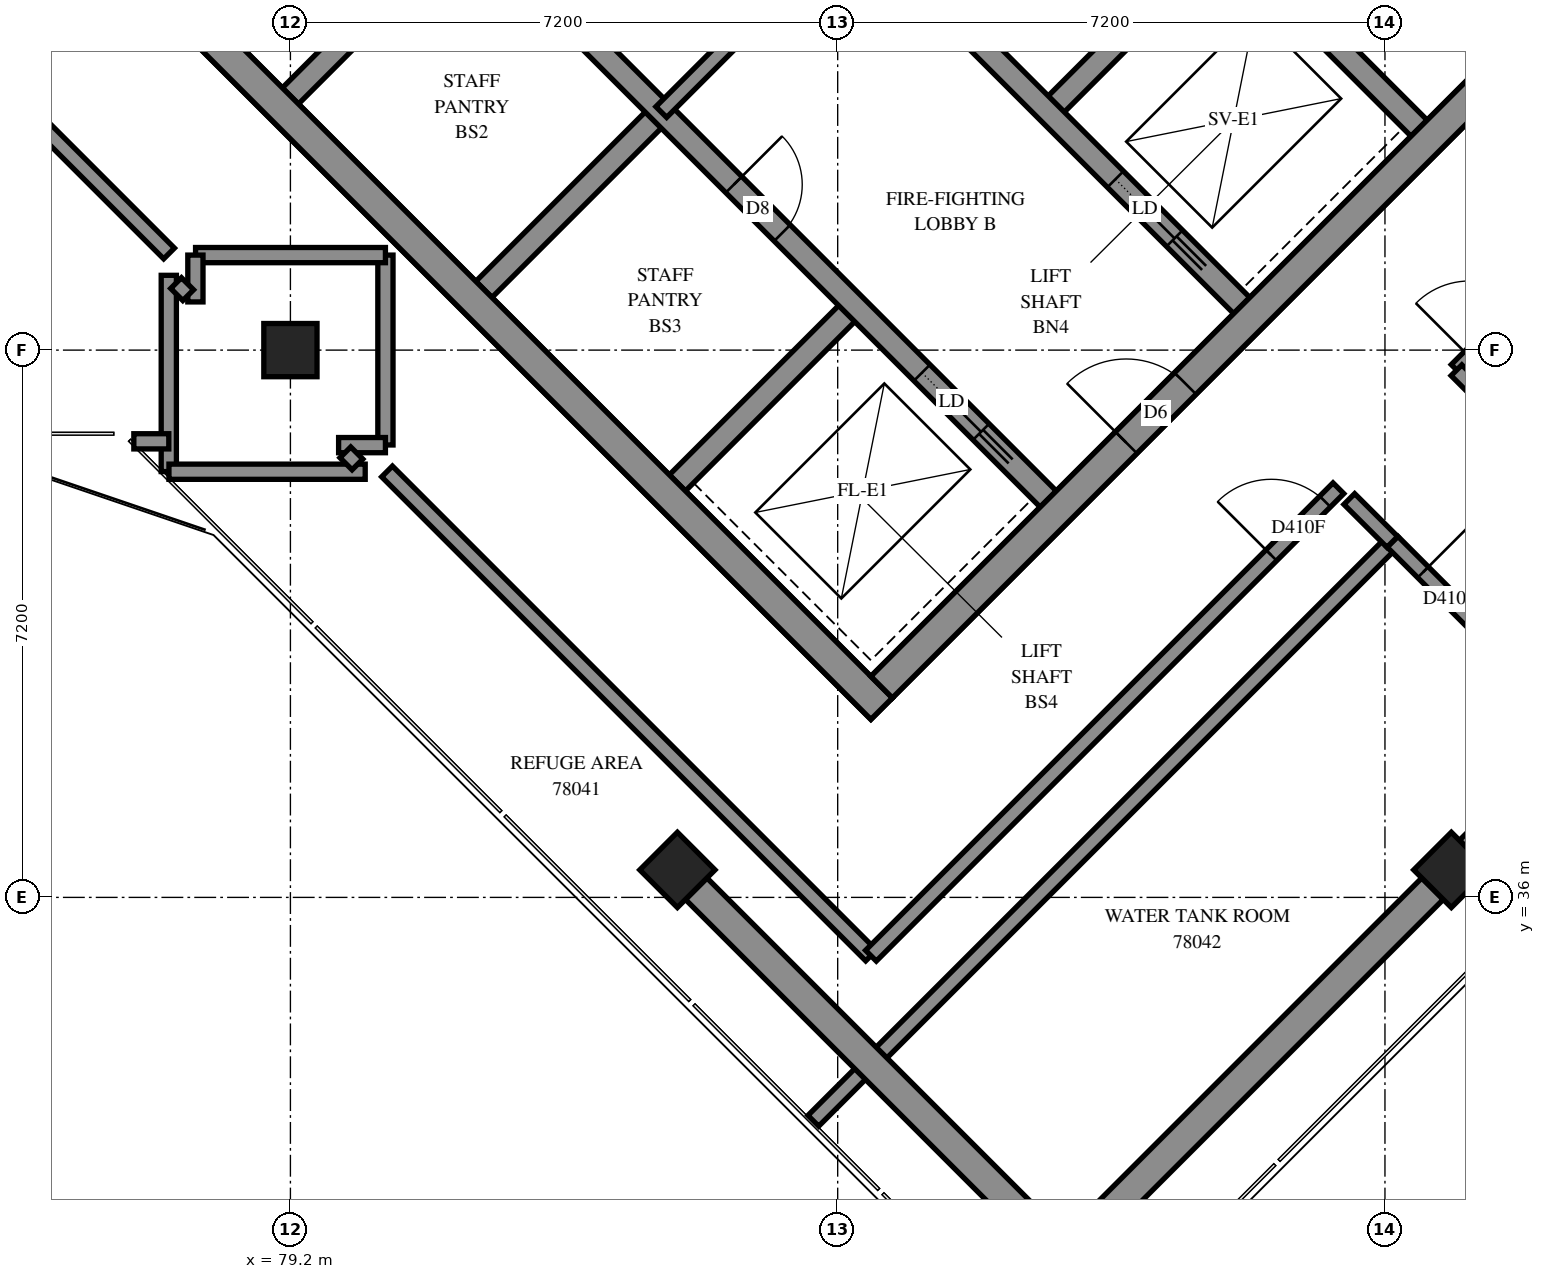
"""IFC4 building model, lengths in metres.
Left out: names, types, materials, properties, quantities, classifications, styles, units other than length and angle.
Written with IfcOpenShell. Run it as: python <this file> out.ifc"""

import sys

from ifc_helpers import new_model, si_unit, direction, frame, frame_2d, origin, origin_2d, place, context, subcontext, project, spatial, rectangle, extrude, element, fill, save


model = new_model("IFC4")
c1 = context("Model", 3, precision=1e-05, world=origin(), true_north=direction((0.0, 1.0)))
c2 = subcontext(c1, "Body", "Model", "MODEL_VIEW")
j1 = project(units=[si_unit("LENGTHUNIT", "METRE"), si_unit("PLANEANGLEUNIT", "RADIAN")], contexts=[c1])
p1 = place(None, origin())
s1 = spatial("IfcSite", under=j1, at=p1, CompositionType="ELEMENT")
p2 = place(p1, origin())
s2 = spatial("IfcBuilding", under=s1, at=p2, CompositionType="ELEMENT")
p3 = place(p2, frame((0.0, 0.0, 284.6)))
s3 = spatial("IfcBuildingStorey", under=s2, at=p3, CompositionType="ELEMENT", Elevation=284.6)
for number, where, z_axis, x_axis in (
    (1, (79.2, 43.2, 0.0), (0.0, 0.0, 1.0), (1.0, 0.0, 0.0)),
    (2, (84.291, 36.362, 0.0), (0.0, 0.0, 1.0), (0.707, -0.707, 0.0)),
    (3, (94.474, 36.362, 0.0), (0.0, 0.0, 1.0), (0.707, -0.707, 0.0)),
):
    element("IfcColumn", number, at=place(p3, frame(where, z_axis=z_axis, x_axis=x_axis)), inside=s3, PredefinedType="COLUMN", context=c2, shape_type="SweptSolid", body=[
        extrude(rectangle(XDim=0.7, YDim=0.7, at=origin_2d()), origin(), (0.0, 0.0, 1.0), 5.7),
    ])
p4 = place(p3, frame((76.23, 49.231, -0.3), z_axis=(0.0, 0.0, 1.0), x_axis=(0.7071034917, -0.7071100706, 0.0)))
e4 = element("IfcWall", 4, at=p4, inside=s3, PredefinedType="SHEAR", context=c2, shape_type="SweptSolid", body=[
    extrude(rectangle(XDim=15.2, YDim=0.4, at=frame_2d((7.6, 0.0))), origin(), (0.0, 0.0, 1.0), 5.3),
])
p5 = place(p3, frame((86.978, 38.766, -0.3), z_axis=(0.0, 0.0, 1.0), x_axis=(0.7071067812, 0.7071067812, 0.0)))
e5 = element("IfcWall", 5, at=p5, inside=s3, PredefinedType="SHEAR", context=c2, shape_type="SweptSolid", body=[
    extrude(rectangle(XDim=14.4, YDim=0.4, at=frame_2d((7.2, 0.0))), origin(), (0.0, 0.0, 1.0), 5.3),
])
p6 = place(p5, frame((4.55, 0.0, 0.3)))
e6 = element("IfcOpeningElement", 6, at=p6, cuts=e5, PredefinedType="OPENING", context=c2, shape_type="SweptSolid", body=[
    extrude(rectangle(XDim=1.1, YDim=2.1, at=frame_2d((0.55, 1.05))), frame((0.0, 0.21, 0.0), z_axis=(0.0, -1.0, 0.0), x_axis=(1.0, 0.0, 0.0)), (0.0, 0.0, 1.0), 0.42),
])
p7 = place(p5, frame((11.35, 0.0, 0.3)))
e7 = element("IfcOpeningElement", 7, at=p7, cuts=e5, PredefinedType="OPENING", context=c2, shape_type="SweptSolid", body=[
    extrude(rectangle(XDim=1.1, YDim=2.1, at=frame_2d((0.55, 1.05))), frame((0.0, 0.21, 0.0), z_axis=(0.0, -1.0, 0.0), x_axis=(1.0, 0.0, 0.0)), (0.0, 0.0, 1.0), 0.42),
])
p8 = place(p3, frame((79.2, 46.544, 0.0), z_axis=(0.0, 0.0, 1.0), x_axis=(0.7071219326, 0.7070916295, 0.0)))
e8 = element("IfcWall", 8, at=p8, inside=s3, PredefinedType="SOLIDWALL", context=c2, shape_type="SweptSolid", body=[
    extrude(rectangle(XDim=3.3, YDim=0.3, at=frame_2d((1.65, 0.0))), origin(), (0.0, 0.0, 1.0), 5.7),
])
for number, where, z_axis, x_axis in (
    (9, (81.746, 43.999, 0.0), (0.0, 0.0, 1.0), (0.707, 0.707, 0.0)),
    (10, (84.291, 41.453, 0.0), (0.0, 0.0, 1.0), (0.707, 0.707, 0.0)),
):
    element("IfcWall", number, at=place(p3, frame(where, z_axis=z_axis, x_axis=x_axis)), inside=s3, PredefinedType="SOLIDWALL", context=c2, shape_type="SweptSolid", body=[
        extrude(rectangle(XDim=3.3, YDim=0.3, at=frame_2d((1.65, 0.0))), origin(), (0.0, 0.0, 1.0), 5.7),
    ])
p9 = place(p3, frame((89.17, 46.332, 0.0), z_axis=(0.0, 0.0, 1.0), x_axis=(0.7071067812, 0.7071067812, 0.0)))
e11 = element("IfcWall", 11, at=p9, inside=s3, PredefinedType="SOLIDWALL", context=c2, shape_type="SweptSolid", body=[
    extrude(rectangle(XDim=3.3, YDim=0.3, at=frame_2d((1.65, 0.0))), origin(), (0.0, 0.0, 1.0), 5.7),
])
p10 = place(p3, frame((78.988, 51.423, 0.0), z_axis=(0.0, 0.0, 1.0), x_axis=(0.7071067812, -0.7071067812, 0.0)))
e12 = element("IfcWall", 12, at=p10, inside=s3, PredefinedType="SOLIDWALL", context=c2, shape_type="SweptSolid", body=[
    extrude(rectangle(XDim=14.4, YDim=0.3, at=frame_2d((7.2, 0.0))), origin(), (0.0, 0.0, 1.0), 5.7),
])
p11 = place(p10, frame((1.35, 0.0, 0.0)))
e13 = element("IfcOpeningElement", 13, at=p11, cuts=e12, PredefinedType="OPENING", context=c2, shape_type="SweptSolid", body=[
    extrude(rectangle(XDim=0.9, YDim=2.1, at=frame_2d((0.45, 1.05))), frame((0.0, 0.16, 0.0), z_axis=(0.0, -1.0, 0.0), x_axis=(1.0, 0.0, 0.0)), (0.0, 0.0, 1.0), 0.32),
])
p12 = place(p10, frame((4.95, 0.0, 0.0)))
e14 = element("IfcOpeningElement", 14, at=p12, cuts=e12, PredefinedType="OPENING", context=c2, shape_type="SweptSolid", body=[
    extrude(rectangle(XDim=0.9, YDim=2.1, at=frame_2d((0.45, 1.05))), frame((0.0, 0.16, 0.0), z_axis=(0.0, -1.0, 0.0), x_axis=(1.0, 0.0, 0.0)), (0.0, 0.0, 1.0), 0.32),
])
p13 = place(p10, frame((8.55, 0.0, 0.0)))
e15 = element("IfcOpeningElement", 15, at=p13, cuts=e12, PredefinedType="OPENING", context=c2, shape_type="SweptSolid", body=[
    extrude(rectangle(XDim=0.9, YDim=2.1, at=frame_2d((0.45, 1.05))), frame((0.0, 0.16, 0.0), z_axis=(0.0, -1.0, 0.0), x_axis=(1.0, 0.0, 0.0)), (0.0, 0.0, 1.0), 0.32),
])
p14 = place(p10, frame((12.05, 0.0, 0.0)))
e16 = element("IfcOpeningElement", 16, at=p14, cuts=e12, PredefinedType="OPENING", context=c2, shape_type="SweptSolid", body=[
    extrude(rectangle(XDim=1.1, YDim=2.1, at=frame_2d((0.55, 1.05))), frame((0.0, 0.16, 0.0), z_axis=(0.0, -1.0, 0.0), x_axis=(1.0, 0.0, 0.0)), (0.0, 0.0, 1.0), 0.32),
])
p15 = place(p3, frame((81.534, 53.969, 0.0), z_axis=(0.0, 0.0, 1.0), x_axis=(0.707103309, -0.7071102534, 0.0)))
e17 = element("IfcWall", 17, at=p15, inside=s3, PredefinedType="SOLIDWALL", context=c2, shape_type="SweptSolid", body=[
    extrude(rectangle(XDim=14.4, YDim=0.3, at=frame_2d((7.2, 0.0))), origin(), (0.0, 0.0, 1.0), 5.7),
])
p16 = place(p15, frame((8.55, 0.0, 0.0)))
e18 = element("IfcOpeningElement", 18, at=p16, cuts=e17, PredefinedType="OPENING", context=c2, shape_type="SweptSolid", body=[
    extrude(rectangle(XDim=0.9, YDim=2.1, at=frame_2d((0.45, 1.05))), frame((0.0, 0.16, 0.0), z_axis=(0.0, -1.0, 0.0), x_axis=(1.0, 0.0, 0.0)), (0.0, 0.0, 1.0), 0.32),
])
p17 = place(p15, frame((12.05, 0.0, 0.0)))
e19 = element("IfcOpeningElement", 19, at=p17, cuts=e17, PredefinedType="OPENING", context=c2, shape_type="SweptSolid", body=[
    extrude(rectangle(XDim=1.1, YDim=2.1, at=frame_2d((0.55, 1.05))), frame((0.0, 0.16, 0.0), z_axis=(0.0, -1.0, 0.0), x_axis=(1.0, 0.0, 0.0)), (0.0, 0.0, 1.0), 0.32),
])
p18 = place(p3, frame((88.958, 51.211, 0.0), z_axis=(0.0, 0.0, 1.0), x_axis=(0.7070998367, -0.7071137256, 0.0)))
e20 = element("IfcWall", 20, at=p18, inside=s3, PredefinedType="SOLIDWALL", context=c2, shape_type="SweptSolid", body=[
    extrude(rectangle(XDim=7.2, YDim=0.3, at=frame_2d((3.6, 0.0))), origin(), (0.0, 0.0, 1.0), 5.7),
])
p19 = place(p3, frame((84.079, 46.332, 0.0), z_axis=(0.0, 0.0, 1.0), x_axis=(0.7071067812, 0.7071067812, 0.0)))
e21 = element("IfcWall", 21, at=p19, inside=s3, PredefinedType="PARTITIONING", context=c2, shape_type="SweptSolid", body=[
    extrude(rectangle(XDim=3.6, YDim=0.2, at=frame_2d((1.8, 0.0))), origin(), (0.0, 0.0, 1.0), 5.7),
])
p20 = place(p19, frame((1.25, 0.0, 0.0)))
e22 = element("IfcOpeningElement", 22, at=p20, cuts=e21, PredefinedType="OPENING", context=c2, shape_type="SweptSolid", body=[
    extrude(rectangle(XDim=1.1, YDim=2.1, at=frame_2d((0.55, 1.05))), frame((0.0, 0.11, 0.0), z_axis=(0.0, -1.0, 0.0), x_axis=(1.0, 0.0, 0.0)), (0.0, 0.0, 1.0), 0.22),
])
p21 = place(p3, frame((86.079, 33.061, 0.0), z_axis=(0.0, 0.0, 1.0), x_axis=(0.7071067812, 0.7071067812, 0.0)))
e23 = element("IfcWall", 23, at=p21, inside=s3, PredefinedType="PARTITIONING", context=c2, shape_type="SweptSolid", body=[
    extrude(rectangle(XDim=10.771, YDim=0.2, at=frame_2d((5.385, 0.0))), origin(), (0.0, 0.0, 1.0), 5.7),
])
p22 = place(p3, frame((80.472, 41.603, 0.0), z_axis=(0.0, 0.0, 1.0), x_axis=(0.7071067812, -0.7071067812, 0.0)))
e24 = element("IfcWall", 24, at=p22, inside=s3, PredefinedType="PARTITIONING", context=c2, shape_type="SweptSolid", body=[
    extrude(rectangle(XDim=9.006, YDim=0.2, at=frame_2d((4.503, 0.0))), origin(), (0.0, 0.0, 1.0), 5.7),
])
p23 = place(p3, frame((94.543, 42.939, 0.0), z_axis=(0.0, 0.0, 1.0), x_axis=(0.7071067812, 0.7071067812, 0.0)))
e25 = element("IfcWall", 25, at=p23, inside=s3, PredefinedType="PARTITIONING", context=c2, shape_type="SweptSolid", body=[
    extrude(rectangle(XDim=8.7, YDim=0.2, at=frame_2d((4.35, 0.0))), origin(), (0.0, 0.0, 1.0), 5.7),
])
p24 = place(p23, frame((0.242, 0.0, 0.0)))
e26 = element("IfcOpeningElement", 26, at=p24, cuts=e25, PredefinedType="OPENING", context=c2, shape_type="SweptSolid", body=[
    extrude(rectangle(XDim=1.0, YDim=2.1, at=frame_2d((0.5, 1.05))), frame((0.0, 0.11, 0.0), z_axis=(0.0, -1.0, 0.0), x_axis=(1.0, 0.0, 0.0)), (0.0, 0.0, 1.0), 0.22),
])
p25 = place(p3, frame((86.837, 35.233, 0.0), z_axis=(0.0, 0.0, 1.0), x_axis=(0.7071067812, 0.7071067812, 0.0)))
e27 = element("IfcWall", 27, at=p25, inside=s3, PredefinedType="PARTITIONING", context=c2, shape_type="SweptSolid", body=[
    extrude(rectangle(XDim=8.697, YDim=0.2, at=frame_2d((4.349, 0.0))), origin(), (0.0, 0.0, 1.0), 5.7),
])
p26 = place(p25, frame((7.45, 0.0, 0.0)))
e28 = element("IfcOpeningElement", 28, at=p26, cuts=e27, PredefinedType="OPENING", context=c2, shape_type="SweptSolid", body=[
    extrude(rectangle(XDim=1.0, YDim=2.1, at=frame_2d((0.5, 1.05))), frame((0.0, 0.11, 0.0), z_axis=(0.0, -1.0, 0.0), x_axis=(1.0, 0.0, 0.0)), (0.0, 0.0, 1.0), 0.22),
])
p27 = place(p3, frame((89.031, 30.921, 0.0), z_axis=(0.0, 0.0, 1.0), x_axis=(0.7071067812, 0.7071067812, 0.0)))
e29 = element("IfcWall", 29, at=p27, inside=s3, PredefinedType="PARTITIONING", context=c2, shape_type="SweptSolid", body=[
    extrude(rectangle(XDim=8.191, YDim=0.2, at=frame_2d((4.096, 0.0))), origin(), (0.0, 0.0, 1.0), 5.2),
])
p28 = place(p3, frame((94.541, 42.935, 0.0), z_axis=(0.0, 0.0, 1.0), x_axis=(0.7071067812, -0.7071067812, 0.0)))
e30 = element("IfcWall", 30, at=p28, inside=s3, PredefinedType="PARTITIONING", context=c2, shape_type="SweptSolid", body=[
    extrude(rectangle(XDim=4.599, YDim=0.2, at=frame_2d((2.3, 0.0))), origin(), (0.0, 0.0, 1.0), 5.7),
])
p29 = place(p28, frame((1.508, 0.0, 0.0)))
e31 = element("IfcOpeningElement", 31, at=p29, cuts=e30, PredefinedType="OPENING", context=c2, shape_type="SweptSolid", body=[
    extrude(rectangle(XDim=1.0, YDim=2.1, at=frame_2d((0.5, 1.05))), frame((0.0, 0.11, 0.0), z_axis=(0.0, -1.0, 0.0), x_axis=(1.0, 0.0, 0.0)), (0.0, 0.0, 1.0), 0.22),
])
p30 = place(p3, frame((74.537, 47.538, 0.0), z_axis=(0.0, 0.0, 1.0), x_axis=(0.7071067812, -0.7071067812, 0.0)))
e32 = element("IfcWall", 32, at=p30, inside=s3, PredefinedType="PARTITIONING", context=c2, shape_type="SweptSolid", body=[
    extrude(rectangle(XDim=4.336, YDim=0.2, at=frame_2d((2.168, 0.0))), origin(), (0.0, 0.0, 1.0), 5.7),
])
p31 = place(p30, frame((0.122, 0.0, 0.0)))
e33 = element("IfcOpeningElement", 33, at=p31, cuts=e32, PredefinedType="OPENING", context=c2, shape_type="SweptSolid", body=[
    extrude(rectangle(XDim=1.0, YDim=2.1, at=frame_2d((0.5, 1.05))), frame((0.0, 0.11, 0.0), z_axis=(0.0, -1.0, 0.0), x_axis=(1.0, 0.0, 0.0)), (0.0, 0.0, 1.0), 0.22),
])
p32 = place(p3, frame((93.699, 40.679, 0.0), z_axis=(0.0, 0.0, 1.0), x_axis=(0.7071067812, -0.7071067812, 0.0)))
e34 = element("IfcWall", 34, at=p32, inside=s3, PredefinedType="PARTITIONING", context=c2, shape_type="SweptSolid", body=[
    extrude(rectangle(XDim=3.601, YDim=0.2, at=frame_2d((1.8, 0.0))), origin(), (0.0, 0.0, 1.0), 5.7),
])
p33 = place(p32, frame((0.568, 0.0, 0.0)))
e35 = element("IfcOpeningElement", 35, at=p33, cuts=e34, PredefinedType="OPENING", context=c2, shape_type="SweptSolid", body=[
    extrude(rectangle(XDim=1.0, YDim=2.1, at=frame_2d((0.5, 1.05))), frame((0.0, 0.11, 0.0), z_axis=(0.0, -1.0, 0.0), x_axis=(1.0, 0.0, 0.0)), (0.0, 0.0, 1.0), 0.22),
])
for number, where, z_axis, x_axis in (
    (36, (77.6, 41.602, 0.0), (0.0, 0.0, 1.0), (0.0, 1.0, 0.0)),
    (37, (77.602, 41.6, 0.0), (0.0, 0.0, 1.0), (1.0, 0.0, 0.0)),
):
    element("IfcWall", number, at=place(p3, frame(where, z_axis=z_axis, x_axis=x_axis)), inside=s3, PredefinedType="PARTITIONING", context=c2, shape_type="SweptSolid", body=[
        extrude(rectangle(XDim=2.582, YDim=0.2, at=frame_2d((1.291, 0.0))), origin(), (0.0, 0.0, 1.0), 5.7),
    ])
for number, where, z_axis, x_axis in (
    (38, (80.45, 41.952, 0.0), (0.0, 0.0, 1.0), (0.0, 1.0, 0.0)),
    (39, (77.952, 44.45, 0.0), (0.0, 0.0, 1.0), (1.0, 0.0, 0.0)),
):
    element("IfcWall", number, at=place(p3, frame(where, z_axis=z_axis, x_axis=x_axis)), inside=s3, PredefinedType="PARTITIONING", context=c2, shape_type="SweptSolid", body=[
        extrude(rectangle(XDim=2.498, YDim=0.2, at=frame_2d((1.249, 0.0))), origin(), (0.0, 0.0, 1.0), 5.7),
    ])
p34 = place(p3, frame((93.131, 41.241, 0.0), z_axis=(0.0, 0.0, 1.0), x_axis=(0.7083571881, -0.7058541592, 0.0)))
e40 = element("IfcWall", 40, at=p34, inside=s3, PredefinedType="PARTITIONING", context=c2, shape_type="SweptSolid", body=[
    extrude(rectangle(XDim=0.799, YDim=0.2, at=frame_2d((0.4, 0.0))), origin(), (0.0, 0.0, 1.0), 5.7),
])
for number, where, z_axis, x_axis in (
    (41, (79.834, 41.95, 0.0), (0.0, 0.0, 1.0), (1.0, 0.0, 0.0)),
    (42, (77.95, 43.834, 0.0), (0.0, 0.0, 1.0), (0.0, 1.0, 0.0)),
):
    element("IfcWall", number, at=place(p3, frame(where, z_axis=z_axis, x_axis=x_axis)), inside=s3, PredefinedType="PARTITIONING", context=c2, shape_type="SweptSolid", body=[
        extrude(rectangle(XDim=0.616, YDim=0.2, at=frame_2d((0.308, 0.0))), origin(), (0.0, 0.0, 1.0), 5.7),
    ])
for number, where, z_axis, x_axis in (
    (43, (77.696, 44.082, 0.0), (0.0, 0.0, 1.0), (0.707, -0.707, 0.0)),
    (44, (79.923, 41.855, 0.0), (0.0, 0.0, 1.0), (0.707, -0.707, 0.0)),
):
    element("IfcWall", number, at=place(p3, frame(where, z_axis=z_axis, x_axis=x_axis)), inside=s3, PredefinedType="PARTITIONING", context=c2, shape_type="SweptSolid", body=[
        extrude(rectangle(XDim=0.225, YDim=0.2, at=frame_2d((0.112, 0.0))), origin(), (0.0, 0.0, 1.0), 5.7),
    ])
p35 = place(p3, frame((77.14, 42.0, 0.0), z_axis=(0.0, 0.0, 1.0), x_axis=(1.0, 0.0, 0.0)))
e45 = element("IfcWall", 45, at=p35, inside=s3, PredefinedType="PARTITIONING", context=c2, shape_type="SweptSolid", body=[
    extrude(rectangle(XDim=0.46, YDim=0.2, at=frame_2d((0.23, 0.0))), origin(), (0.0, 0.0, 1.0), 5.7),
])
p36 = place(p6, origin())
e46 = element("IfcDoor", 46, at=p36, inside=s3, OperationType="DOUBLE_DOOR_SINGLE_SWING", PredefinedType="DOOR", context=c2, shape_type="SweptSolid", body=[
    extrude(rectangle(XDim=1.1, YDim=2.1, at=frame_2d((0.55, 1.05))), frame((0.0, 0.025, 0.0), z_axis=(0.0, -1.0, 0.0), x_axis=(1.0, 0.0, 0.0)), (0.0, 0.0, 1.0), 0.05),
])
fill(e6, e46)
p37 = place(p13, origin())
e47 = element("IfcDoor", 47, at=p37, inside=s3, OperationType="SINGLE_SWING_LEFT", PredefinedType="DOOR", context=c2, shape_type="SweptSolid", body=[
    extrude(rectangle(XDim=0.9, YDim=2.1, at=frame_2d((0.45, 1.05))), frame((0.0, 0.025, 0.0), z_axis=(0.0, -1.0, 0.0), x_axis=(1.0, 0.0, 0.0)), (0.0, 0.0, 1.0), 0.05),
])
fill(e15, e47)
p38 = place(p14, origin())
e48 = element("IfcDoor", 48, at=p38, inside=s3, OperationType="SLIDING_TO_RIGHT", PredefinedType="DOOR", context=c2, shape_type="SweptSolid", body=[
    extrude(rectangle(XDim=1.1, YDim=2.1, at=frame_2d((0.55, 1.05))), frame((0.0, 0.025, 0.0), z_axis=(0.0, -1.0, 0.0), x_axis=(1.0, 0.0, 0.0)), (0.0, 0.0, 1.0), 0.05),
])
fill(e16, e48)
p39 = place(p17, origin())
e49 = element("IfcDoor", 49, at=p39, inside=s3, OperationType="SLIDING_TO_RIGHT", PredefinedType="DOOR", context=c2, shape_type="SweptSolid", body=[
    extrude(rectangle(XDim=1.1, YDim=2.1, at=frame_2d((0.55, 1.05))), frame((0.0, 0.025, 0.0), z_axis=(0.0, -1.0, 0.0), x_axis=(1.0, 0.0, 0.0)), (0.0, 0.0, 1.0), 0.05),
])
fill(e19, e49)
p40 = place(p26, origin())
e50 = element("IfcDoor", 50, at=p40, inside=s3, OperationType="SINGLE_SWING_LEFT", PredefinedType="DOOR", context=c2, shape_type="SweptSolid", body=[
    extrude(rectangle(XDim=1.0, YDim=2.1, at=frame_2d((0.5, 1.05))), frame((0.0, 0.025, 0.0), z_axis=(0.0, -1.0, 0.0), x_axis=(1.0, 0.0, 0.0)), (0.0, 0.0, 1.0), 0.05),
])
fill(e28, e50)
p41 = place(p33, origin())
e51 = element("IfcDoor", 51, at=p41, inside=s3, OperationType="SINGLE_SWING_LEFT", PredefinedType="DOOR", context=c2, shape_type="SweptSolid", body=[
    extrude(rectangle(XDim=1.0, YDim=2.1, at=frame_2d((0.5, 1.05))), frame((0.0, 0.025, 0.0), z_axis=(0.0, -1.0, 0.0), x_axis=(1.0, 0.0, 0.0)), (0.0, 0.0, 1.0), 0.05),
])
fill(e35, e51)
save(model, sys.argv[1])
